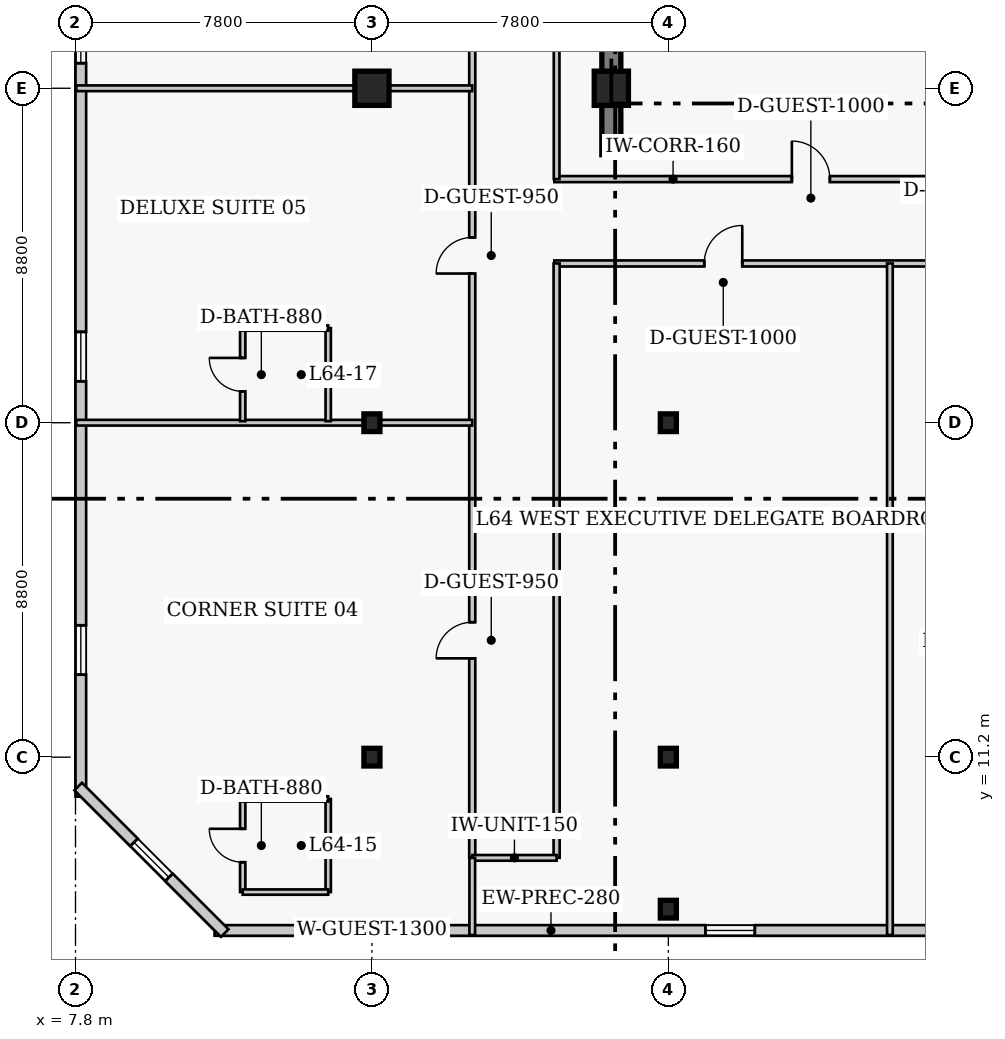
"""IFC4 building model, lengths in metres.
Left out: names, types, materials, properties, quantities, classifications, styles, units other than length and angle.
Written with IfcOpenShell. Run it as: python <this file> out.ifc"""

import sys

from ifc_helpers import new_model, si_unit, direction, frame, frame_2d, origin, origin_2d, place, context, subcontext, project, spatial, rectangle, i_section, extrude, element, fill, save


model = new_model("IFC4")
c1 = context("Model", 3, precision=1e-05, world=origin(), true_north=direction((0.0, 1.0)))
c2 = subcontext(c1, "Body", "Model", "MODEL_VIEW")
j1 = project(units=[si_unit("LENGTHUNIT", "METRE"), si_unit("PLANEANGLEUNIT", "RADIAN")], contexts=[c1])
p1 = place(None, origin())
s1 = spatial("IfcSite", under=j1, at=p1, CompositionType="ELEMENT")
p2 = place(p1, origin())
s2 = spatial("IfcBuilding", under=s1, at=p2, CompositionType="ELEMENT")
p3 = place(p2, frame((0.0, 0.0, 257.4)))
s3 = spatial("IfcBuildingStorey", under=s2, at=p3, CompositionType="ELEMENT", Elevation=257.4)
p4 = place(p3, frame((21.9, 27.05, 0.0), z_axis=(0.0, 0.0, 1.0), x_axis=(0.0, 1.0, 0.0)))
e1 = element("IfcWall", 1, at=p4, inside=s3, PredefinedType="SHEAR", context=c2, shape_type="SweptSolid", body=[
    extrude(rectangle(XDim=13.52, YDim=0.5, at=frame_2d((6.76, 0.0))), origin(), (0.0, 0.0, 1.0), 4.0),
])
for number, where, z_axis, x_axis in (
    (2, (15.6, 11.2, 0.0), (0.0, 0.0, 1.0), (1.0, 0.0, 0.0)),
    (3, (15.6, 20.0, 0.0), (0.0, 0.0, 1.0), (1.0, 0.0, 0.0)),
):
    element("IfcColumn", number, at=place(p3, frame(where, z_axis=z_axis, x_axis=x_axis)), inside=s3, PredefinedType="COLUMN", context=c2, shape_type="SweptSolid", body=[
        extrude(i_section(OverallWidth=0.422, OverallDepth=0.465, WebThickness=0.045, FlangeThickness=0.073, FilletRadius=0.017, at=origin_2d()), origin(), (0.0, 0.0, 1.0), 4.0),
    ])
p5 = place(p3, frame((15.6, 28.8, 0.0), z_axis=(0.0, 0.0, 1.0), x_axis=(1.0, 0.0, 0.0)))
e4 = element("IfcColumn", 4, at=p5, inside=s3, PredefinedType="COLUMN", context=c2, shape_type="SweptSolid", body=[
    extrude(rectangle(XDim=0.9, YDim=0.9, at=origin_2d()), origin(), (0.0, 0.0, 1.0), 4.0),
])
for number, where, z_axis, x_axis in (
    (5, (23.4, 11.2, 0.0), (0.0, 0.0, 1.0), (1.0, 0.0, 0.0)),
    (6, (23.4, 20.0, 0.0), (0.0, 0.0, 1.0), (1.0, 0.0, 0.0)),
):
    element("IfcColumn", number, at=place(p3, frame(where, z_axis=z_axis, x_axis=x_axis)), inside=s3, PredefinedType="COLUMN", context=c2, shape_type="SweptSolid", body=[
        extrude(i_section(OverallWidth=0.422, OverallDepth=0.465, WebThickness=0.045, FlangeThickness=0.073, FilletRadius=0.017, at=origin_2d()), origin(), (0.0, 0.0, 1.0), 4.0),
    ])
p6 = place(p3, frame((21.9, 28.8, 0.0), z_axis=(0.0, 0.0, 1.0), x_axis=(1.0, 0.0, 0.0)))
e7 = element("IfcColumn", 7, at=p6, inside=s3, PredefinedType="COLUMN", context=c2, shape_type="SweptSolid", body=[
    extrude(rectangle(XDim=0.9, YDim=0.9, at=origin_2d()), origin(), (0.0, 0.0, 1.0), 4.0),
])
p7 = place(p3, frame((23.4, 7.2, 0.0), z_axis=(0.0, 0.0, 1.0), x_axis=(1.0, 0.0, 0.0)))
e8 = element("IfcColumn", 8, at=p7, inside=s3, PredefinedType="COLUMN", context=c2, shape_type="SweptSolid", body=[
    extrude(i_section(OverallWidth=0.422, OverallDepth=0.465, WebThickness=0.045, FlangeThickness=0.073, FilletRadius=0.017, at=origin_2d()), origin(), (0.0, 0.0, 1.0), 4.0),
])
p8 = place(p3, frame((11.46, 6.64, 0.0), z_axis=(0.0, 0.0, 1.0), x_axis=(1.0, 0.0, 0.0)))
e9 = element("IfcWall", 9, at=p8, inside=s3, PredefinedType="SOLIDWALL", context=c2, shape_type="SweptSolid", body=[
    extrude(rectangle(XDim=24.83, YDim=0.28, at=frame_2d((12.415, 0.0))), origin(), (0.0, 0.0, 1.0), 3.76),
])
p9 = place(p8, frame((3.488, 0.0, 0.85)))
e10 = element("IfcOpeningElement", 10, at=p9, cuts=e9, PredefinedType="OPENING", context=c2, shape_type="SweptSolid", body=[
    extrude(rectangle(XDim=1.3, YDim=1.7, at=frame_2d((0.65, 0.85))), frame((0.0, 0.15, 0.0), z_axis=(0.0, -1.0, 0.0), x_axis=(1.0, 0.0, 0.0)), (0.0, 0.0, 1.0), 0.3),
])
p10 = place(p8, frame((12.915, 0.0, 0.85)))
e11 = element("IfcOpeningElement", 11, at=p10, cuts=e9, PredefinedType="OPENING", context=c2, shape_type="SweptSolid", body=[
    extrude(rectangle(XDim=1.3, YDim=1.7, at=frame_2d((0.65, 0.85))), frame((0.0, 0.15, 0.0), z_axis=(0.0, -1.0, 0.0), x_axis=(1.0, 0.0, 0.0)), (0.0, 0.0, 1.0), 0.3),
])
p11 = place(p8, frame((20.692, 0.0, 0.85)))
e12 = element("IfcOpeningElement", 12, at=p11, cuts=e9, PredefinedType="OPENING", context=c2, shape_type="SweptSolid", body=[
    extrude(rectangle(XDim=1.3, YDim=1.7, at=frame_2d((0.65, 0.85))), frame((0.0, 0.15, 0.0), z_axis=(0.0, -1.0, 0.0), x_axis=(1.0, 0.0, 0.0)), (0.0, 0.0, 1.0), 0.3),
])
p12 = place(p3, frame((7.94, 41.04, 0.0), z_axis=(0.0, 0.0, 1.0), x_axis=(0.0, -1.0, 0.0)))
e13 = element("IfcWall", 13, at=p12, inside=s3, PredefinedType="SOLIDWALL", context=c2, shape_type="SweptSolid", body=[
    extrude(rectangle(XDim=30.88, YDim=0.28, at=frame_2d((15.44, 0.0))), origin(), (0.0, 0.0, 1.0), 3.76),
])
p13 = place(p12, frame((3.21, 0.0, 0.85)))
e14 = element("IfcOpeningElement", 14, at=p13, cuts=e13, PredefinedType="OPENING", context=c2, shape_type="SweptSolid", body=[
    extrude(rectangle(XDim=1.3, YDim=1.7, at=frame_2d((0.65, 0.85))), frame((0.0, 0.15, 0.0), z_axis=(0.0, -1.0, 0.0), x_axis=(1.0, 0.0, 0.0)), (0.0, 0.0, 1.0), 0.3),
])
p14 = place(p12, frame((10.28, 0.0, 0.85)))
e15 = element("IfcOpeningElement", 15, at=p14, cuts=e13, PredefinedType="OPENING", context=c2, shape_type="SweptSolid", body=[
    extrude(rectangle(XDim=1.3, YDim=1.7, at=frame_2d((0.65, 0.85))), frame((0.0, 0.15, 0.0), z_axis=(0.0, -1.0, 0.0), x_axis=(1.0, 0.0, 0.0)), (0.0, 0.0, 1.0), 0.3),
])
p15 = place(p12, frame((18.65, 0.0, 0.85)))
e16 = element("IfcOpeningElement", 16, at=p15, cuts=e13, PredefinedType="OPENING", context=c2, shape_type="SweptSolid", body=[
    extrude(rectangle(XDim=1.3, YDim=1.7, at=frame_2d((0.65, 0.85))), frame((0.0, 0.15, 0.0), z_axis=(0.0, -1.0, 0.0), x_axis=(1.0, 0.0, 0.0)), (0.0, 0.0, 1.0), 0.3),
])
p16 = place(p12, frame((26.37, 0.0, 0.85)))
e17 = element("IfcOpeningElement", 17, at=p16, cuts=e13, PredefinedType="OPENING", context=c2, shape_type="SweptSolid", body=[
    extrude(rectangle(XDim=1.3, YDim=1.7, at=frame_2d((0.65, 0.85))), frame((0.0, 0.15, 0.0), z_axis=(0.0, -1.0, 0.0), x_axis=(1.0, 0.0, 0.0)), (0.0, 0.0, 1.0), 0.3),
])
p17 = place(p3, frame((7.871, 10.427, 0.0), z_axis=(0.0, 0.0, 1.0), x_axis=(0.707129162587, -0.707084399077, 0.0)))
e18 = element("IfcWall", 18, at=p17, inside=s3, PredefinedType="SOLIDWALL", context=c2, shape_type="SweptSolid", body=[
    extrude(rectangle(XDim=5.454, YDim=0.28, at=frame_2d((2.727, 0.0))), origin(), (0.0, 0.0, 1.0), 3.76),
])
p18 = place(p17, frame((2.077, 0.0, 0.85)))
e19 = element("IfcOpeningElement", 19, at=p18, cuts=e18, PredefinedType="OPENING", context=c2, shape_type="SweptSolid", body=[
    extrude(rectangle(XDim=1.3, YDim=1.7, at=frame_2d((0.65, 0.85))), frame((0.0, 0.15, 0.0), z_axis=(0.0, -1.0, 0.0), x_axis=(1.0, 0.0, 0.0)), (0.0, 0.0, 1.0), 0.3),
])
p19 = place(p3, frame((20.4, 26.41, 0.0), z_axis=(0.0, 0.0, 1.0), x_axis=(1.0, 0.0, 0.0)))
e20 = element("IfcWall", 20, at=p19, inside=s3, PredefinedType="PARTITIONING", context=c2, shape_type="SweptSolid", body=[
    extrude(rectangle(XDim=13.25, YDim=0.16, at=frame_2d((6.625, 0.0))), origin(), (0.0, 0.0, 1.0), 3.76),
])
p20 = place(p19, frame((6.25, 0.0, 0.0)))
e21 = element("IfcOpeningElement", 21, at=p20, cuts=e20, PredefinedType="OPENING", context=c2, shape_type="SweptSolid", body=[
    extrude(rectangle(XDim=1.0, YDim=2.15, at=frame_2d((0.5, 1.075))), frame((0.0, 0.09, 0.0), z_axis=(0.0, -1.0, 0.0), x_axis=(1.0, 0.0, 0.0)), (0.0, 0.0, 1.0), 0.18),
])
p21 = place(p3, frame((20.4, 24.19, 0.0), z_axis=(0.0, 0.0, 1.0), x_axis=(1.0, 0.0, 0.0)))
e22 = element("IfcWall", 22, at=p21, inside=s3, PredefinedType="PARTITIONING", context=c2, shape_type="SweptSolid", body=[
    extrude(rectangle(XDim=15.4, YDim=0.16, at=frame_2d((7.7, 0.0))), origin(), (0.0, 0.0, 1.0), 3.76),
])
p22 = place(p21, frame((3.945, 0.0, 0.0)))
e23 = element("IfcOpeningElement", 23, at=p22, cuts=e22, PredefinedType="OPENING", context=c2, shape_type="SweptSolid", body=[
    extrude(rectangle(XDim=1.0, YDim=2.15, at=frame_2d((0.5, 1.075))), frame((0.0, 0.09, 0.0), z_axis=(0.0, -1.0, 0.0), x_axis=(1.0, 0.0, 0.0)), (0.0, 0.0, 1.0), 0.18),
])
p23 = place(p21, frame((10.485, 0.0, 0.0)))
e24 = element("IfcOpeningElement", 24, at=p23, cuts=e22, PredefinedType="OPENING", context=c2, shape_type="SweptSolid", body=[
    extrude(rectangle(XDim=0.95, YDim=2.1, at=frame_2d((0.475, 1.05))), frame((0.0, 0.09, 0.0), z_axis=(0.0, -1.0, 0.0), x_axis=(1.0, 0.0, 0.0)), (0.0, 0.0, 1.0), 0.18),
])
p24 = place(p3, frame((18.24, 8.55, 0.0), z_axis=(0.0, 0.0, 1.0), x_axis=(0.0, 1.0, 0.0)))
e25 = element("IfcWall", 25, at=p24, inside=s3, PredefinedType="PARTITIONING", context=c2, shape_type="SweptSolid", body=[
    extrude(rectangle(XDim=32.1, YDim=0.16, at=frame_2d((16.05, 0.0))), origin(), (0.0, 0.0, 1.0), 3.76),
])
p25 = place(p24, frame((5.25, 0.0, 0.0)))
e26 = element("IfcOpeningElement", 26, at=p25, cuts=e25, PredefinedType="OPENING", context=c2, shape_type="SweptSolid", body=[
    extrude(rectangle(XDim=0.95, YDim=2.1, at=frame_2d((0.475, 1.05))), frame((0.0, 0.09, 0.0), z_axis=(0.0, -1.0, 0.0), x_axis=(1.0, 0.0, 0.0)), (0.0, 0.0, 1.0), 0.18),
])
p26 = place(p24, frame((15.375, 0.0, 0.0)))
e27 = element("IfcOpeningElement", 27, at=p26, cuts=e25, PredefinedType="OPENING", context=c2, shape_type="SweptSolid", body=[
    extrude(rectangle(XDim=0.95, YDim=2.1, at=frame_2d((0.475, 1.05))), frame((0.0, 0.09, 0.0), z_axis=(0.0, -1.0, 0.0), x_axis=(1.0, 0.0, 0.0)), (0.0, 0.0, 1.0), 0.18),
])
p27 = place(p24, frame((23.075, 0.0, 0.0)))
e28 = element("IfcOpeningElement", 28, at=p27, cuts=e25, PredefinedType="OPENING", context=c2, shape_type="SweptSolid", body=[
    extrude(rectangle(XDim=0.95, YDim=2.1, at=frame_2d((0.475, 1.05))), frame((0.0, 0.09, 0.0), z_axis=(0.0, -1.0, 0.0), x_axis=(1.0, 0.0, 0.0)), (0.0, 0.0, 1.0), 0.18),
])
p28 = place(p24, frame((29.03, 0.0, 0.0)))
e29 = element("IfcOpeningElement", 29, at=p28, cuts=e25, PredefinedType="OPENING", context=c2, shape_type="SweptSolid", body=[
    extrude(rectangle(XDim=1.0, YDim=2.15, at=frame_2d((0.5, 1.075))), frame((0.0, 0.09, 0.0), z_axis=(0.0, -1.0, 0.0), x_axis=(1.0, 0.0, 0.0)), (0.0, 0.0, 1.0), 0.18),
])
p29 = place(p3, frame((20.46, 8.55, 0.0), z_axis=(0.0, 0.0, 1.0), x_axis=(0.0, 1.0, 0.0)))
e30 = element("IfcWall", 30, at=p29, inside=s3, PredefinedType="PARTITIONING", context=c2, shape_type="SweptSolid", body=[
    extrude(rectangle(XDim=15.64, YDim=0.16, at=frame_2d((7.82, 0.0))), origin(), (0.0, 0.0, 1.0), 3.76),
])
p30 = place(p3, frame((18.24, 8.55, 0.0), z_axis=(0.0, 0.0, 1.0), x_axis=(1.0, 0.0, 0.0)))
e31 = element("IfcWall", 31, at=p30, inside=s3, PredefinedType="PARTITIONING", context=c2, shape_type="SweptSolid", body=[
    extrude(rectangle(XDim=2.22, YDim=0.15, at=frame_2d((1.11, 0.0))), origin(), (0.0, 0.0, 1.0), 3.76),
])
p31 = place(p3, frame((20.46, 26.41, 0.0), z_axis=(0.0, 0.0, 1.0), x_axis=(0.0, 1.0, 0.0)))
e32 = element("IfcWall", 32, at=p31, inside=s3, PredefinedType="PARTITIONING", context=c2, shape_type="SweptSolid", body=[
    extrude(rectangle(XDim=6.39, YDim=0.15, at=frame_2d((3.195, 0.0))), origin(), (0.0, 0.0, 1.0), 3.76),
])
p32 = place(p3, frame((29.23, 6.52, 0.0), z_axis=(0.0, 0.0, 1.0), x_axis=(0.0, 1.0, 0.0)))
e33 = element("IfcWall", 33, at=p32, inside=s3, PredefinedType="PARTITIONING", context=c2, shape_type="SweptSolid", body=[
    extrude(rectangle(XDim=17.67, YDim=0.15, at=frame_2d((8.835, 0.0))), origin(), (0.0, 0.0, 1.0), 3.76),
])
p33 = place(p3, frame((18.24, 6.52, 0.0), z_axis=(0.0, 0.0, 1.0), x_axis=(0.0, 1.0, 0.0)))
e34 = element("IfcWall", 34, at=p33, inside=s3, PredefinedType="PARTITIONING", context=c2, shape_type="SweptSolid", body=[
    extrude(rectangle(XDim=2.03, YDim=0.15, at=frame_2d((1.015, 0.0))), origin(), (0.0, 0.0, 1.0), 3.76),
])
p34 = place(p3, frame((12.2, 7.65, 0.0), z_axis=(0.0, 0.0, 1.0), x_axis=(0.0, 1.0, 0.0)))
e35 = element("IfcWall", 35, at=p34, inside=s3, PredefinedType="PLUMBINGWALL", context=c2, shape_type="SweptSolid", body=[
    extrude(rectangle(XDim=2.45, YDim=0.14, at=frame_2d((1.225, 0.0))), origin(), (0.0, 0.0, 1.0), 3.76),
])
p35 = place(p34, frame((0.785, 0.0, 0.0)))
e36 = element("IfcOpeningElement", 36, at=p35, cuts=e35, PredefinedType="OPENING", context=c2, shape_type="SweptSolid", body=[
    extrude(rectangle(XDim=0.88, YDim=2.05, at=frame_2d((0.44, 1.025))), frame((0.0, 0.08, 0.0), z_axis=(0.0, -1.0, 0.0), x_axis=(1.0, 0.0, 0.0)), (0.0, 0.0, 1.0), 0.16),
])
p36 = place(p3, frame((14.45, 7.65, 0.0), z_axis=(0.0, 0.0, 1.0), x_axis=(0.0, 1.0, 0.0)))
e37 = element("IfcWall", 37, at=p36, inside=s3, PredefinedType="PLUMBINGWALL", context=c2, shape_type="SweptSolid", body=[
    extrude(rectangle(XDim=2.45, YDim=0.14, at=frame_2d((1.225, 0.0))), origin(), (0.0, 0.0, 1.0), 3.76),
])
for number, where, z_axis, x_axis in (
    (38, (12.2, 7.65, 0.0), (0.0, 0.0, 1.0), (1.0, 0.0, 0.0)),
    (39, (12.2, 10.1, 0.0), (0.0, 0.0, 1.0), (1.0, 0.0, 0.0)),
):
    element("IfcWall", number, at=place(p3, frame(where, z_axis=z_axis, x_axis=x_axis)), inside=s3, PredefinedType="PLUMBINGWALL", context=c2, shape_type="SweptSolid", body=[
        extrude(rectangle(XDim=2.25, YDim=0.14, at=frame_2d((1.125, 0.0))), origin(), (0.0, 0.0, 1.0), 3.76),
    ])
p37 = place(p3, frame((7.82, 20.0, 0.0), z_axis=(0.0, 0.0, 1.0), x_axis=(1.0, 0.0, 0.0)))
e40 = element("IfcWall", 40, at=p37, inside=s3, PredefinedType="PARTITIONING", context=c2, shape_type="SweptSolid", body=[
    extrude(rectangle(XDim=10.42, YDim=0.15, at=frame_2d((5.21, 0.0))), origin(), (0.0, 0.0, 1.0), 3.064),
])
p38 = place(p3, frame((12.2, 20.04, 0.0), z_axis=(0.0, 0.0, 1.0), x_axis=(0.0, 1.0, 0.0)))
e41 = element("IfcWall", 41, at=p38, inside=s3, PredefinedType="PLUMBINGWALL", context=c2, shape_type="SweptSolid", body=[
    extrude(rectangle(XDim=2.45, YDim=0.14, at=frame_2d((1.225, 0.0))), origin(), (0.0, 0.0, 1.0), 3.76),
])
p39 = place(p38, frame((0.785, 0.0, 0.0)))
e42 = element("IfcOpeningElement", 42, at=p39, cuts=e41, PredefinedType="OPENING", context=c2, shape_type="SweptSolid", body=[
    extrude(rectangle(XDim=0.88, YDim=2.05, at=frame_2d((0.44, 1.025))), frame((0.0, 0.08, 0.0), z_axis=(0.0, -1.0, 0.0), x_axis=(1.0, 0.0, 0.0)), (0.0, 0.0, 1.0), 0.16),
])
p40 = place(p3, frame((14.45, 20.04, 0.0), z_axis=(0.0, 0.0, 1.0), x_axis=(0.0, 1.0, 0.0)))
e43 = element("IfcWall", 43, at=p40, inside=s3, PredefinedType="PLUMBINGWALL", context=c2, shape_type="SweptSolid", body=[
    extrude(rectangle(XDim=2.45, YDim=0.14, at=frame_2d((1.225, 0.0))), origin(), (0.0, 0.0, 1.0), 3.76),
])
p41 = place(p3, frame((12.2, 22.49, 0.0), z_axis=(0.0, 0.0, 1.0), x_axis=(1.0, 0.0, 0.0)))
e44 = element("IfcWall", 44, at=p41, inside=s3, PredefinedType="PLUMBINGWALL", context=c2, shape_type="SweptSolid", body=[
    extrude(rectangle(XDim=2.25, YDim=0.14, at=frame_2d((1.125, 0.0))), origin(), (0.0, 0.0, 1.0), 3.76),
])
p42 = place(p3, frame((7.82, 28.8, 0.0), z_axis=(0.0, 0.0, 1.0), x_axis=(1.0, 0.0, 0.0)))
e45 = element("IfcWall", 45, at=p42, inside=s3, PredefinedType="PARTITIONING", context=c2, shape_type="SweptSolid", body=[
    extrude(rectangle(XDim=10.42, YDim=0.15, at=frame_2d((5.21, 0.0))), origin(), (0.0, 0.0, 1.0), 3.064),
])
p43 = place(p9, origin())
e46 = element("IfcWindow", 46, at=p43, inside=s3, PartitioningType="SINGLE_PANEL", PredefinedType="WINDOW", context=c2, shape_type="SweptSolid", body=[
    extrude(rectangle(XDim=1.3, YDim=1.7, at=frame_2d((0.65, 0.85))), frame((0.0, 0.03, 0.0), z_axis=(0.0, -1.0, 0.0), x_axis=(1.0, 0.0, 0.0)), (0.0, 0.0, 1.0), 0.06),
])
fill(e10, e46)
p44 = place(p10, origin())
e47 = element("IfcWindow", 47, at=p44, inside=s3, PartitioningType="SINGLE_PANEL", PredefinedType="WINDOW", context=c2, shape_type="SweptSolid", body=[
    extrude(rectangle(XDim=1.3, YDim=1.7, at=frame_2d((0.65, 0.85))), frame((0.0, 0.03, 0.0), z_axis=(0.0, -1.0, 0.0), x_axis=(1.0, 0.0, 0.0)), (0.0, 0.0, 1.0), 0.06),
])
fill(e11, e47)
p45 = place(p14, origin())
e48 = element("IfcWindow", 48, at=p45, inside=s3, PartitioningType="SINGLE_PANEL", PredefinedType="WINDOW", context=c2, shape_type="SweptSolid", body=[
    extrude(rectangle(XDim=1.3, YDim=1.7, at=frame_2d((0.65, 0.85))), frame((0.0, 0.03, 0.0), z_axis=(0.0, -1.0, 0.0), x_axis=(1.0, 0.0, 0.0)), (0.0, 0.0, 1.0), 0.06),
])
fill(e15, e48)
p46 = place(p15, origin())
e49 = element("IfcWindow", 49, at=p46, inside=s3, PartitioningType="SINGLE_PANEL", PredefinedType="WINDOW", context=c2, shape_type="SweptSolid", body=[
    extrude(rectangle(XDim=1.3, YDim=1.7, at=frame_2d((0.65, 0.85))), frame((0.0, 0.03, 0.0), z_axis=(0.0, -1.0, 0.0), x_axis=(1.0, 0.0, 0.0)), (0.0, 0.0, 1.0), 0.06),
])
fill(e16, e49)
p47 = place(p16, origin())
e50 = element("IfcWindow", 50, at=p47, inside=s3, PartitioningType="SINGLE_PANEL", PredefinedType="WINDOW", context=c2, shape_type="SweptSolid", body=[
    extrude(rectangle(XDim=1.3, YDim=1.7, at=frame_2d((0.65, 0.85))), frame((0.0, 0.03, 0.0), z_axis=(0.0, -1.0, 0.0), x_axis=(1.0, 0.0, 0.0)), (0.0, 0.0, 1.0), 0.06),
])
fill(e17, e50)
p48 = place(p18, origin())
e51 = element("IfcWindow", 51, at=p48, inside=s3, PartitioningType="SINGLE_PANEL", PredefinedType="WINDOW", context=c2, shape_type="SweptSolid", body=[
    extrude(rectangle(XDim=1.3, YDim=1.7, at=frame_2d((0.65, 0.85))), frame((0.0, 0.03, 0.0), z_axis=(0.0, -1.0, 0.0), x_axis=(1.0, 0.0, 0.0)), (0.0, 0.0, 1.0), 0.06),
])
fill(e19, e51)
p49 = place(p20, origin())
e52 = element("IfcDoor", 52, at=p49, inside=s3, OperationType="SINGLE_SWING_LEFT", PredefinedType="DOOR", context=c2, shape_type="SweptSolid", body=[
    extrude(rectangle(XDim=1.0, YDim=2.15, at=frame_2d((0.5, 1.075))), frame((0.0, 0.025, 0.0), z_axis=(0.0, -1.0, 0.0), x_axis=(1.0, 0.0, 0.0)), (0.0, 0.0, 1.0), 0.05),
])
fill(e21, e52)
p50 = place(p22, origin())
e53 = element("IfcDoor", 53, at=p50, inside=s3, OperationType="SINGLE_SWING_RIGHT", PredefinedType="DOOR", context=c2, shape_type="SweptSolid", body=[
    extrude(rectangle(XDim=1.0, YDim=2.15, at=frame_2d((0.5, 1.075))), frame((0.0, 0.025, 0.0), z_axis=(0.0, -1.0, 0.0), x_axis=(1.0, 0.0, 0.0)), (0.0, 0.0, 1.0), 0.05),
])
fill(e23, e53)
p51 = place(p35, origin())
e54 = element("IfcDoor", 54, at=p51, inside=s3, OperationType="SINGLE_SWING_RIGHT", PredefinedType="DOOR", context=c2, shape_type="SweptSolid", body=[
    extrude(rectangle(XDim=0.88, YDim=2.05, at=frame_2d((0.44, 1.025))), frame((0.0, 0.025, 0.0), z_axis=(0.0, -1.0, 0.0), x_axis=(1.0, 0.0, 0.0)), (0.0, 0.0, 1.0), 0.05),
])
fill(e36, e54)
p52 = place(p25, origin())
e55 = element("IfcDoor", 55, at=p52, inside=s3, OperationType="SINGLE_SWING_LEFT", PredefinedType="DOOR", context=c2, shape_type="SweptSolid", body=[
    extrude(rectangle(XDim=0.95, YDim=2.1, at=frame_2d((0.475, 1.05))), frame((0.0, 0.025, 0.0), z_axis=(0.0, -1.0, 0.0), x_axis=(1.0, 0.0, 0.0)), (0.0, 0.0, 1.0), 0.05),
])
fill(e26, e55)
p53 = place(p39, origin())
e56 = element("IfcDoor", 56, at=p53, inside=s3, OperationType="SINGLE_SWING_RIGHT", PredefinedType="DOOR", context=c2, shape_type="SweptSolid", body=[
    extrude(rectangle(XDim=0.88, YDim=2.05, at=frame_2d((0.44, 1.025))), frame((0.0, 0.025, 0.0), z_axis=(0.0, -1.0, 0.0), x_axis=(1.0, 0.0, 0.0)), (0.0, 0.0, 1.0), 0.05),
])
fill(e42, e56)
p54 = place(p26, origin())
e57 = element("IfcDoor", 57, at=p54, inside=s3, OperationType="SINGLE_SWING_LEFT", PredefinedType="DOOR", context=c2, shape_type="SweptSolid", body=[
    extrude(rectangle(XDim=0.95, YDim=2.1, at=frame_2d((0.475, 1.05))), frame((0.0, 0.025, 0.0), z_axis=(0.0, -1.0, 0.0), x_axis=(1.0, 0.0, 0.0)), (0.0, 0.0, 1.0), 0.05),
])
fill(e27, e57)
save(model, sys.argv[1])
